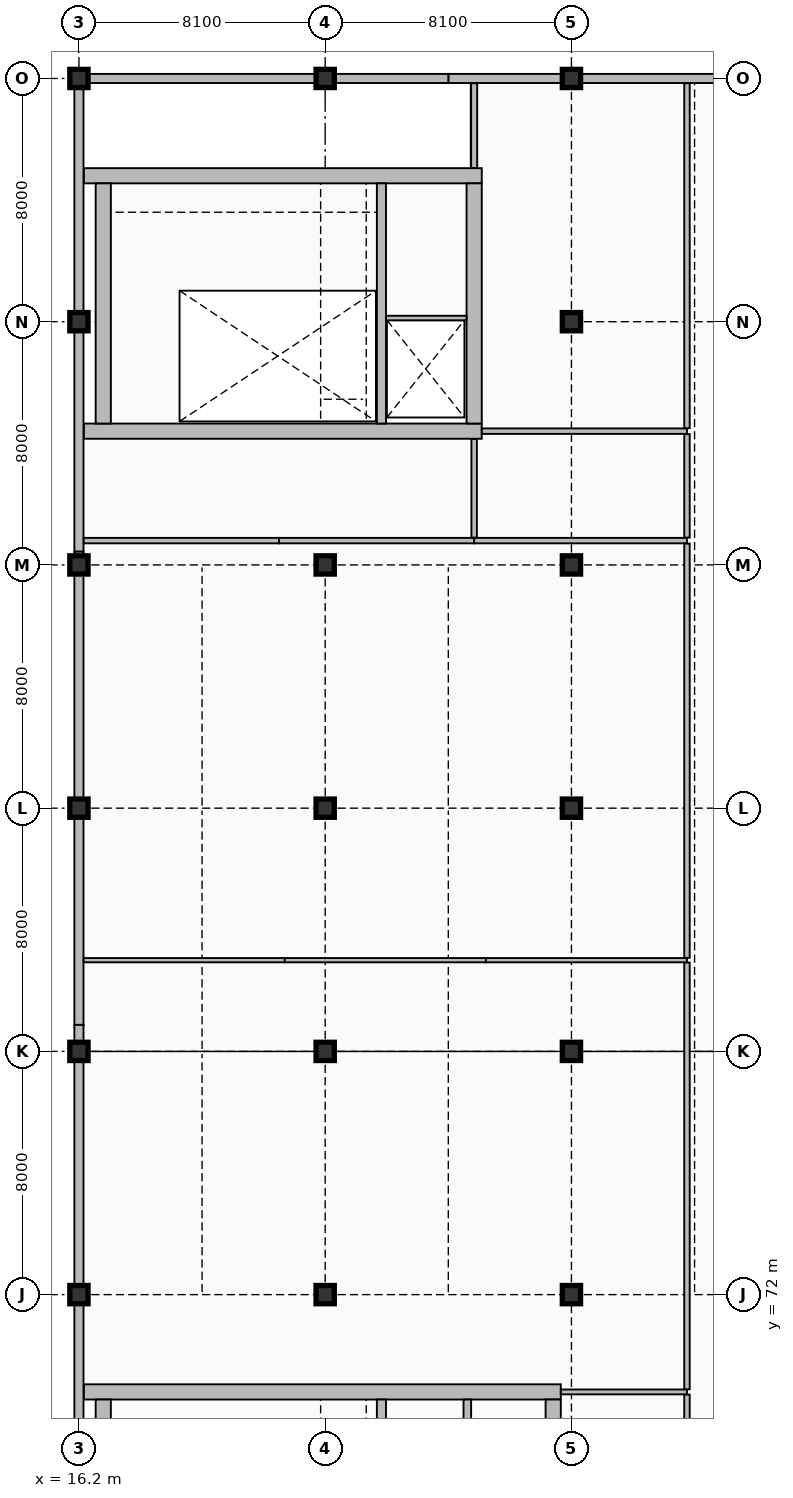
"""IFC4 building model, lengths in metres.
Left out: names, types, materials, properties, quantities, classifications, styles, units other than length and angle.
Written with IfcOpenShell. Run it as: python <this file> out.ifc"""

import sys

from ifc_helpers import new_model, si_unit, direction, frame, frame_2d, origin, origin_2d, place, context, subcontext, project, spatial, rectangle, extrude, element, fill, save


model = new_model("IFC4")
c1 = context("Model", 3, precision=1e-05, world=origin(), true_north=direction((0.0, 1.0)))
c2 = subcontext(c1, "Body", "Model", "MODEL_VIEW")
j1 = project(units=[si_unit("LENGTHUNIT", "METRE"), si_unit("PLANEANGLEUNIT", "RADIAN")], contexts=[c1])
p1 = place(None, origin())
s1 = spatial("IfcSite", under=j1, at=p1, CompositionType="ELEMENT")
p2 = place(p1, origin())
s2 = spatial("IfcBuilding", under=s1, at=p2, CompositionType="ELEMENT")
p3 = place(p2, frame((0.0, 0.0, 19.8)))
s3 = spatial("IfcBuildingStorey", under=s2, at=p3, CompositionType="ELEMENT", Elevation=19.8)
p4 = place(p3, frame((16.36, 68.8, 0.0), z_axis=(0.0, 0.0, 1.0), x_axis=(1.0, 0.0, 0.0)))
e1 = element("IfcWall", 1, at=p4, inside=s3, PredefinedType="SHEAR", context=c2, shape_type="SweptSolid", body=[
    extrude(rectangle(XDim=15.69, YDim=0.5, at=frame_2d((7.845, 0.0))), origin(), (0.0, 0.0, 1.0), 5.1),
])
for number, where, z_axis, x_axis in (
    (2, (17.0, 60.65, 0.0), (0.0, 0.0, 1.0), (0.0, 1.0, 0.0)),
    (3, (31.8, 60.65, 0.0), (0.0, 0.0, 1.0), (0.0, 1.0, 0.0)),
):
    element("IfcWall", number, at=place(p3, frame(where, z_axis=z_axis, x_axis=x_axis)), inside=s3, PredefinedType="SHEAR", context=c2, shape_type="SweptSolid", body=[
        extrude(rectangle(XDim=7.9, YDim=0.5, at=frame_2d((3.95, 0.0))), origin(), (0.0, 0.0, 1.0), 5.1),
    ])
p5 = place(p3, frame((26.15, 60.65, 0.0), z_axis=(0.0, 0.0, 1.0), x_axis=(0.0, 1.0, 0.0)))
e4 = element("IfcWall", 4, at=p5, inside=s3, PredefinedType="SHEAR", context=c2, shape_type="SweptSolid", body=[
    extrude(rectangle(XDim=7.9, YDim=0.3, at=frame_2d((3.95, 0.0))), origin(), (0.0, 0.0, 1.0), 5.1),
])
p6 = place(p3, frame((28.975, 60.65, 0.0), z_axis=(0.0, 0.0, 1.0), x_axis=(0.0, 1.0, 0.0)))
e5 = element("IfcWall", 5, at=p6, inside=s3, PredefinedType="SHEAR", context=c2, shape_type="SweptSolid", body=[
    extrude(rectangle(XDim=7.9, YDim=0.25, at=frame_2d((3.95, 0.0))), origin(), (0.0, 0.0, 1.0), 5.1),
])
p7 = place(p3, frame((16.36, 100.4, 0.0), z_axis=(0.0, 0.0, 1.0), x_axis=(1.0, 0.0, 0.0)))
e6 = element("IfcWall", 6, at=p7, inside=s3, PredefinedType="SHEAR", context=c2, shape_type="SweptSolid", body=[
    extrude(rectangle(XDim=13.09, YDim=0.5, at=frame_2d((6.545, 0.0))), origin(), (0.0, 0.0, 1.0), 5.1),
])
p8 = place(p7, frame((1.39, 0.0, 0.0)))
e7 = element("IfcOpeningElement", 7, at=p8, cuts=e6, PredefinedType="OPENING", context=c2, shape_type="SweptSolid", body=[
    extrude(rectangle(XDim=1.15, YDim=2.25, at=frame_2d((0.575, 1.125))), frame((0.0, 0.26, 0.0), z_axis=(0.0, -1.0, 0.0), x_axis=(1.0, 0.0, 0.0)), (0.0, 0.0, 1.0), 0.52),
])
p9 = place(p7, frame((10.695, 0.0, 0.0)))
e8 = element("IfcOpeningElement", 8, at=p9, cuts=e6, PredefinedType="OPENING", context=c2, shape_type="SweptSolid", body=[
    extrude(rectangle(XDim=1.1, YDim=2.2, at=frame_2d((0.55, 1.1))), frame((0.0, 0.26, 0.0), z_axis=(0.0, -1.0, 0.0), x_axis=(1.0, 0.0, 0.0)), (0.0, 0.0, 1.0), 0.52),
])
p10 = place(p3, frame((16.36, 108.8, 0.0), z_axis=(0.0, 0.0, 1.0), x_axis=(1.0, 0.0, 0.0)))
e9 = element("IfcWall", 9, at=p10, inside=s3, PredefinedType="SHEAR", context=c2, shape_type="SweptSolid", body=[
    extrude(rectangle(XDim=13.09, YDim=0.5, at=frame_2d((6.545, 0.0))), origin(), (0.0, 0.0, 1.0), 5.1),
])
for number, where, z_axis, x_axis in (
    (10, (17.0, 100.65, 0.0), (0.0, 0.0, 1.0), (0.0, 1.0, 0.0)),
    (11, (29.2, 100.65, 0.0), (0.0, 0.0, 1.0), (0.0, 1.0, 0.0)),
):
    element("IfcWall", number, at=place(p3, frame(where, z_axis=z_axis, x_axis=x_axis)), inside=s3, PredefinedType="SHEAR", context=c2, shape_type="SweptSolid", body=[
        extrude(rectangle(XDim=7.9, YDim=0.5, at=frame_2d((3.95, 0.0))), origin(), (0.0, 0.0, 1.0), 5.1),
    ])
p11 = place(p3, frame((26.15, 100.65, 0.0), z_axis=(0.0, 0.0, 1.0), x_axis=(0.0, 1.0, 0.0)))
e12 = element("IfcWall", 12, at=p11, inside=s3, PredefinedType="SHEAR", context=c2, shape_type="SweptSolid", body=[
    extrude(rectangle(XDim=7.9, YDim=0.3, at=frame_2d((3.95, 0.0))), origin(), (0.0, 0.0, 1.0), 5.1),
])
for number, where, z_axis, x_axis in (
    (13, (16.2, 72.0, 0.0), (0.0, 0.0, 1.0), (1.0, 0.0, 0.0)),
    (14, (16.2, 80.0, 0.0), (0.0, 0.0, 1.0), (1.0, 0.0, 0.0)),
    (15, (16.2, 88.0, 0.0), (0.0, 0.0, 1.0), (1.0, 0.0, 0.0)),
    (16, (16.2, 96.0, 0.0), (0.0, 0.0, 1.0), (1.0, 0.0, 0.0)),
    (17, (16.2, 104.0, 0.0), (0.0, 0.0, 1.0), (1.0, 0.0, 0.0)),
    (18, (16.2, 112.0, 0.0), (0.0, 0.0, 1.0), (1.0, 0.0, 0.0)),
    (19, (24.3, 72.0, 0.0), (0.0, 0.0, 1.0), (1.0, 0.0, 0.0)),
    (20, (24.3, 80.0, 0.0), (0.0, 0.0, 1.0), (1.0, 0.0, 0.0)),
    (21, (24.3, 88.0, 0.0), (0.0, 0.0, 1.0), (1.0, 0.0, 0.0)),
    (22, (24.3, 96.0, 0.0), (0.0, 0.0, 1.0), (1.0, 0.0, 0.0)),
    (23, (24.3, 112.0, 0.0), (0.0, 0.0, 1.0), (1.0, 0.0, 0.0)),
    (24, (32.4, 72.0, 0.0), (0.0, 0.0, 1.0), (1.0, 0.0, 0.0)),
    (25, (32.4, 80.0, 0.0), (0.0, 0.0, 1.0), (1.0, 0.0, 0.0)),
    (26, (32.4, 88.0, 0.0), (0.0, 0.0, 1.0), (1.0, 0.0, 0.0)),
    (27, (32.4, 96.0, 0.0), (0.0, 0.0, 1.0), (1.0, 0.0, 0.0)),
    (28, (32.4, 104.0, 0.0), (0.0, 0.0, 1.0), (1.0, 0.0, 0.0)),
    (29, (32.4, 112.0, 0.0), (0.0, 0.0, 1.0), (1.0, 0.0, 0.0)),
):
    element("IfcColumn", number, at=place(p3, frame(where, z_axis=z_axis, x_axis=x_axis)), inside=s3, PredefinedType="COLUMN", context=c2, shape_type="SweptSolid", body=[
        extrude(rectangle(XDim=0.6, YDim=0.6, at=origin_2d()), origin(), (0.0, 0.0, 1.0), 5.1),
    ])
p12 = place(p3, frame((40.5, 112.0, 0.0), z_axis=(0.0, 0.0, 1.0), x_axis=(-1.0, 0.0, 0.0)))
e30 = element("IfcWall", 30, at=p12, inside=s3, PredefinedType="SOLIDWALL", context=c2, shape_type="SweptSolid", body=[
    extrude(rectangle(XDim=12.15, YDim=0.3, at=frame_2d((6.075, 0.0))), origin(), (0.0, 0.0, 1.0), 4.302),
])
p13 = place(p12, frame((5.4, 0.0, 0.85)))
e31 = element("IfcOpeningElement", 31, at=p13, cuts=e30, PredefinedType="OPENING", context=c2, shape_type="SweptSolid", body=[
    extrude(rectangle(XDim=0.9, YDim=2.4, at=frame_2d((0.45, 1.2))), frame((0.0, 0.16, 0.0), z_axis=(0.0, -1.0, 0.0), x_axis=(1.0, 0.0, 0.0)), (0.0, 0.0, 1.0), 0.32),
])
p14 = place(p3, frame((28.35, 112.0, 0.0), z_axis=(0.0, 0.0, 1.0), x_axis=(-1.0, 0.0, 0.0)))
e32 = element("IfcWall", 32, at=p14, inside=s3, PredefinedType="SOLIDWALL", context=c2, shape_type="SweptSolid", body=[
    extrude(rectangle(XDim=12.15, YDim=0.3, at=frame_2d((6.075, 0.0))), origin(), (0.0, 0.0, 1.0), 4.302),
])
p15 = place(p14, frame((5.4, 0.0, 0.95)))
e33 = element("IfcOpeningElement", 33, at=p15, cuts=e32, PredefinedType="OPENING", context=c2, shape_type="SweptSolid", body=[
    extrude(rectangle(XDim=1.2, YDim=1.8, at=frame_2d((0.6, 0.9))), frame((0.0, 0.16, 0.0), z_axis=(0.0, -1.0, 0.0), x_axis=(1.0, 0.0, 0.0)), (0.0, 0.0, 1.0), 0.32),
])
p16 = place(p3, frame((16.2, 112.0, 0.0), z_axis=(0.0, 0.0, 1.0), x_axis=(0.0, -1.0, 0.0)))
e34 = element("IfcWall", 34, at=p16, inside=s3, PredefinedType="SOLIDWALL", context=c2, shape_type="SweptSolid", body=[
    extrude(rectangle(XDim=15.564, YDim=0.3, at=frame_2d((7.782, 0.0))), origin(), (0.0, 0.0, 1.0), 4.352),
])
p17 = place(p3, frame((16.2, 96.436, 0.0), z_axis=(0.0, 0.0, 1.0), x_axis=(0.0, -1.0, 0.0)))
e35 = element("IfcWall", 35, at=p17, inside=s3, PredefinedType="SOLIDWALL", context=c2, shape_type="SweptSolid", body=[
    extrude(rectangle(XDim=15.564, YDim=0.3, at=frame_2d((7.782, 0.0))), origin(), (0.0, 0.0, 1.0), 4.352),
])
p18 = place(p17, frame((4.5, 0.0, 0.95)))
e36 = element("IfcOpeningElement", 36, at=p18, cuts=e35, PredefinedType="OPENING", context=c2, shape_type="SweptSolid", body=[
    extrude(rectangle(XDim=1.35, YDim=1.8, at=frame_2d((0.675, 0.9))), frame((0.0, 0.16, 0.0), z_axis=(0.0, -1.0, 0.0), x_axis=(1.0, 0.0, 0.0)), (0.0, 0.0, 1.0), 0.32),
])
p19 = place(p3, frame((16.2, 80.872, 0.0), z_axis=(0.0, 0.0, 1.0), x_axis=(0.0, -1.0, 0.0)))
e37 = element("IfcWall", 37, at=p19, inside=s3, PredefinedType="SOLIDWALL", context=c2, shape_type="SweptSolid", body=[
    extrude(rectangle(XDim=15.564, YDim=0.3, at=frame_2d((7.782, 0.0))), origin(), (0.0, 0.0, 1.0), 4.352),
])
p20 = place(p19, frame((4.5, 0.0, 0.85)))
e38 = element("IfcOpeningElement", 38, at=p20, cuts=e37, PredefinedType="OPENING", context=c2, shape_type="SweptSolid", body=[
    extrude(rectangle(XDim=1.35, YDim=2.1, at=frame_2d((0.675, 1.05))), frame((0.0, 0.16, 0.0), z_axis=(0.0, -1.0, 0.0), x_axis=(1.0, 0.0, 0.0)), (0.0, 0.0, 1.0), 0.32),
])
p21 = place(p3, frame((26.3, 104.12, 0.0), z_axis=(0.0, 0.0, 1.0), x_axis=(1.0, 0.0, 0.0)))
e39 = element("IfcWall", 39, at=p21, inside=s3, PredefinedType="PARTITIONING", context=c2, shape_type="SweptSolid", body=[
    extrude(rectangle(XDim=2.65, YDim=0.15, at=frame_2d((1.325, 0.0))), origin(), (0.0, 0.0, 1.0), 4.86),
])
for number, where, z_axis, x_axis in (
    (40, (16.358, 83.0, 0.0), (0.0, 0.0, 1.0), (1.0, 0.0, 0.0)),
    (41, (22.972, 83.0, 0.0), (0.0, 0.0, 1.0), (1.0, 0.0, 0.0)),
    (42, (29.586, 83.0, 0.0), (0.0, 0.0, 1.0), (1.0, 0.0, 0.0)),
):
    element("IfcWall", number, at=place(p3, frame(where, z_axis=z_axis, x_axis=x_axis)), inside=s3, PredefinedType="PARTITIONING", context=c2, shape_type="SweptSolid", body=[
        extrude(rectangle(XDim=6.614, YDim=0.14, at=frame_2d((3.307, 0.0))), origin(), (0.0, 0.0, 1.0), 4.86),
    ])
p22 = place(p3, frame((16.358, 96.8, 0.0), z_axis=(0.0, 0.0, 1.0), x_axis=(1.0, 0.0, 0.0)))
e43 = element("IfcWall", 43, at=p22, inside=s3, PredefinedType="PARTITIONING", context=c2, shape_type="SweptSolid", body=[
    extrude(rectangle(XDim=6.421, YDim=0.18, at=frame_2d((3.21, 0.0))), origin(), (0.0, 0.0, 1.0), 4.86),
])
p23 = place(p3, frame((22.779, 96.8, 0.0), z_axis=(0.0, 0.0, 1.0), x_axis=(1.0, 0.0, 0.0)))
e44 = element("IfcWall", 44, at=p23, inside=s3, PredefinedType="PARTITIONING", context=c2, shape_type="SweptSolid", body=[
    extrude(rectangle(XDim=6.421, YDim=0.18, at=frame_2d((3.21, 0.0))), origin(), (0.0, 0.0, 1.0), 4.86),
])
p24 = place(p3, frame((29.2, 96.8, 0.0), z_axis=(0.0, 0.0, 1.0), x_axis=(1.0, 0.0, 0.0)))
e45 = element("IfcWall", 45, at=p24, inside=s3, PredefinedType="PARTITIONING", context=c2, shape_type="SweptSolid", body=[
    extrude(rectangle(XDim=7.0, YDim=0.18, at=frame_2d((3.5, 0.0))), origin(), (0.0, 0.0, 1.0), 4.86),
])
p25 = place(p3, frame((29.45, 100.4, 0.0), z_axis=(0.0, 0.0, 1.0), x_axis=(1.0, 0.0, 0.0)))
e46 = element("IfcWall", 46, at=p25, inside=s3, PredefinedType="PARTITIONING", context=c2, shape_type="SweptSolid", body=[
    extrude(rectangle(XDim=6.75, YDim=0.18, at=frame_2d((3.375, 0.0))), origin(), (0.0, 0.0, 1.0), 4.86),
])
p26 = place(p3, frame((32.05, 68.8, 0.0), z_axis=(0.0, 0.0, 1.0), x_axis=(1.0, 0.0, 0.0)))
e47 = element("IfcWall", 47, at=p26, inside=s3, PredefinedType="PARTITIONING", context=c2, shape_type="SweptSolid", body=[
    extrude(rectangle(XDim=4.15, YDim=0.16, at=frame_2d((2.075, 0.0))), origin(), (0.0, 0.0, 1.0), 4.86),
])
p27 = place(p3, frame((29.2, 96.898, 0.0), z_axis=(0.0, 0.0, 1.0), x_axis=(0.0, 1.0, 0.0)))
e48 = element("IfcWall", 48, at=p27, inside=s3, PredefinedType="PARTITIONING", context=c2, shape_type="SweptSolid", body=[
    extrude(rectangle(XDim=3.244, YDim=0.18, at=frame_2d((1.622, 0.0))), origin(), (0.0, 0.0, 1.0), 4.86),
])
p28 = place(p27, frame((1.022, 0.0, 0.0)))
e49 = element("IfcOpeningElement", 49, at=p28, cuts=e48, PredefinedType="OPENING", context=c2, shape_type="SweptSolid", body=[
    extrude(rectangle(XDim=1.2, YDim=2.2, at=frame_2d((0.6, 1.1))), frame((0.0, 0.1, 0.0), z_axis=(0.0, -1.0, 0.0), x_axis=(1.0, 0.0, 0.0)), (0.0, 0.0, 1.0), 0.2),
])
p29 = place(p3, frame((29.2, 109.058, 0.0), z_axis=(0.0, 0.0, 1.0), x_axis=(0.0, 1.0, 0.0)))
e50 = element("IfcWall", 50, at=p29, inside=s3, PredefinedType="PARTITIONING", context=c2, shape_type="SweptSolid", body=[
    extrude(rectangle(XDim=2.784, YDim=0.2, at=frame_2d((1.392, 0.0))), origin(), (0.0, 0.0, 1.0), 4.86),
])
p30 = place(p3, frame((36.2, 66.088, 0.0), z_axis=(0.0, 0.0, 1.0), x_axis=(0.0, 1.0, 0.0)))
e51 = element("IfcWall", 51, at=p30, inside=s3, PredefinedType="PARTITIONING", context=c2, shape_type="SweptSolid", body=[
    extrude(rectangle(XDim=2.624, YDim=0.18, at=frame_2d((1.312, 0.0))), origin(), (0.0, 0.0, 1.0), 4.86),
])
p31 = place(p30, frame((0.812, 0.0, 0.0)))
e52 = element("IfcOpeningElement", 52, at=p31, cuts=e51, PredefinedType="OPENING", context=c2, shape_type="SweptSolid", body=[
    extrude(rectangle(XDim=1.0, YDim=2.15, at=frame_2d((0.5, 1.075))), frame((0.0, 0.1, 0.0), z_axis=(0.0, -1.0, 0.0), x_axis=(1.0, 0.0, 0.0)), (0.0, 0.0, 1.0), 0.2),
])
p32 = place(p3, frame((36.2, 68.888, 0.0), z_axis=(0.0, 0.0, 1.0), x_axis=(0.0, 1.0, 0.0)))
e53 = element("IfcWall", 53, at=p32, inside=s3, PredefinedType="PARTITIONING", context=c2, shape_type="SweptSolid", body=[
    extrude(rectangle(XDim=14.034, YDim=0.18, at=frame_2d((7.017, 0.0))), origin(), (0.0, 0.0, 1.0), 4.445),
])
p33 = place(p32, frame((6.517, 0.0, 0.0)))
e54 = element("IfcOpeningElement", 54, at=p33, cuts=e53, PredefinedType="OPENING", context=c2, shape_type="SweptSolid", body=[
    extrude(rectangle(XDim=1.0, YDim=2.2, at=frame_2d((0.5, 1.1))), frame((0.0, 0.1, 0.0), z_axis=(0.0, -1.0, 0.0), x_axis=(1.0, 0.0, 0.0)), (0.0, 0.0, 1.0), 0.2),
])
p34 = place(p3, frame((36.2, 83.078, 0.0), z_axis=(0.0, 0.0, 1.0), x_axis=(0.0, 1.0, 0.0)))
e55 = element("IfcWall", 55, at=p34, inside=s3, PredefinedType="PARTITIONING", context=c2, shape_type="SweptSolid", body=[
    extrude(rectangle(XDim=13.624, YDim=0.18, at=frame_2d((6.812, 0.0))), origin(), (0.0, 0.0, 1.0), 4.445),
])
p35 = place(p34, frame((6.312, 0.0, 0.0)))
e56 = element("IfcOpeningElement", 56, at=p35, cuts=e55, PredefinedType="OPENING", context=c2, shape_type="SweptSolid", body=[
    extrude(rectangle(XDim=1.0, YDim=2.2, at=frame_2d((0.5, 1.1))), frame((0.0, 0.1, 0.0), z_axis=(0.0, -1.0, 0.0), x_axis=(1.0, 0.0, 0.0)), (0.0, 0.0, 1.0), 0.2),
])
p36 = place(p3, frame((36.2, 96.898, 0.0), z_axis=(0.0, 0.0, 1.0), x_axis=(0.0, 1.0, 0.0)))
e57 = element("IfcWall", 57, at=p36, inside=s3, PredefinedType="PARTITIONING", context=c2, shape_type="SweptSolid", body=[
    extrude(rectangle(XDim=3.404, YDim=0.18, at=frame_2d((1.702, 0.0))), origin(), (0.0, 0.0, 1.0), 4.445),
])
p37 = place(p36, frame((1.152, 0.0, 0.0)))
e58 = element("IfcOpeningElement", 58, at=p37, cuts=e57, PredefinedType="OPENING", context=c2, shape_type="SweptSolid", body=[
    extrude(rectangle(XDim=1.1, YDim=2.2, at=frame_2d((0.55, 1.1))), frame((0.0, 0.1, 0.0), z_axis=(0.0, -1.0, 0.0), x_axis=(1.0, 0.0, 0.0)), (0.0, 0.0, 1.0), 0.2),
])
p38 = place(p3, frame((36.2, 100.498, 0.0), z_axis=(0.0, 0.0, 1.0), x_axis=(0.0, 1.0, 0.0)))
e59 = element("IfcWall", 59, at=p38, inside=s3, PredefinedType="PARTITIONING", context=c2, shape_type="SweptSolid", body=[
    extrude(rectangle(XDim=11.344, YDim=0.18, at=frame_2d((5.672, 0.0))), origin(), (0.0, 0.0, 1.0), 4.445),
])
p39 = place(p38, frame((5.172, 0.0, 0.0)))
e60 = element("IfcOpeningElement", 60, at=p39, cuts=e59, PredefinedType="OPENING", context=c2, shape_type="SweptSolid", body=[
    extrude(rectangle(XDim=1.0, YDim=2.2, at=frame_2d((0.5, 1.1))), frame((0.0, 0.1, 0.0), z_axis=(0.0, -1.0, 0.0), x_axis=(1.0, 0.0, 0.0)), (0.0, 0.0, 1.0), 0.2),
])
p40 = place(p13, origin())
e61 = element("IfcWindow", 61, at=p40, inside=s3, PartitioningType="DOUBLE_PANEL_HORIZONTAL", PredefinedType="WINDOW", context=c2, shape_type="SweptSolid", body=[
    extrude(rectangle(XDim=0.9, YDim=2.4, at=frame_2d((0.45, 1.2))), frame((0.0, 0.03, 0.0), z_axis=(0.0, -1.0, 0.0), x_axis=(1.0, 0.0, 0.0)), (0.0, 0.0, 1.0), 0.06),
])
fill(e31, e61)
p41 = place(p15, origin())
e62 = element("IfcWindow", 62, at=p41, inside=s3, PartitioningType="SINGLE_PANEL", PredefinedType="WINDOW", context=c2, shape_type="SweptSolid", body=[
    extrude(rectangle(XDim=1.2, YDim=1.8, at=frame_2d((0.6, 0.9))), frame((0.0, 0.03, 0.0), z_axis=(0.0, -1.0, 0.0), x_axis=(1.0, 0.0, 0.0)), (0.0, 0.0, 1.0), 0.06),
])
fill(e33, e62)
p42 = place(p18, origin())
e63 = element("IfcWindow", 63, at=p42, inside=s3, PartitioningType="DOUBLE_PANEL_VERTICAL", PredefinedType="WINDOW", context=c2, shape_type="SweptSolid", body=[
    extrude(rectangle(XDim=1.35, YDim=1.8, at=frame_2d((0.675, 0.9))), frame((0.0, 0.03, 0.0), z_axis=(0.0, -1.0, 0.0), x_axis=(1.0, 0.0, 0.0)), (0.0, 0.0, 1.0), 0.06),
])
fill(e36, e63)
p43 = place(p20, origin())
e64 = element("IfcWindow", 64, at=p43, inside=s3, PartitioningType="DOUBLE_PANEL_VERTICAL", PredefinedType="WINDOW", context=c2, shape_type="SweptSolid", body=[
    extrude(rectangle(XDim=1.35, YDim=2.1, at=frame_2d((0.675, 1.05))), frame((0.0, 0.03, 0.0), z_axis=(0.0, -1.0, 0.0), x_axis=(1.0, 0.0, 0.0)), (0.0, 0.0, 1.0), 0.06),
])
fill(e38, e64)
p44 = place(p8, origin())
e65 = element("IfcDoor", 65, at=p44, inside=s3, OperationType="SINGLE_SWING_RIGHT", PredefinedType="DOOR", context=c2, shape_type="SweptSolid", body=[
    extrude(rectangle(XDim=1.15, YDim=2.25, at=frame_2d((0.575, 1.125))), frame((0.0, 0.025, 0.0), z_axis=(0.0, -1.0, 0.0), x_axis=(1.0, 0.0, 0.0)), (0.0, 0.0, 1.0), 0.05),
])
fill(e7, e65)
p45 = place(p9, frame((1.1, 0.0, 0.0), z_axis=(0.0, 0.0, 1.0), x_axis=(-1.0, 0.0, 0.0)))
e66 = element("IfcDoor", 66, at=p45, inside=s3, OperationType="DOUBLE_DOOR_SLIDING", PredefinedType="DOOR", context=c2, shape_type="SweptSolid", body=[
    extrude(rectangle(XDim=1.1, YDim=2.2, at=frame_2d((0.55, 1.1))), frame((0.0, 0.025, 0.0), z_axis=(0.0, -1.0, 0.0), x_axis=(1.0, 0.0, 0.0)), (0.0, 0.0, 1.0), 0.05),
])
fill(e8, e66)
p46 = place(p28, frame((1.2, 0.0, 0.0), z_axis=(0.0, 0.0, 1.0), x_axis=(-1.0, 0.0, 0.0)))
e67 = element("IfcDoor", 67, at=p46, inside=s3, OperationType="SINGLE_SWING_LEFT", PredefinedType="DOOR", context=c2, shape_type="SweptSolid", body=[
    extrude(rectangle(XDim=1.2, YDim=2.2, at=frame_2d((0.6, 1.1))), frame((0.0, 0.025, 0.0), z_axis=(0.0, -1.0, 0.0), x_axis=(1.0, 0.0, 0.0)), (0.0, 0.0, 1.0), 0.05),
])
fill(e49, e67)
p47 = place(p33, origin())
e68 = element("IfcDoor", 68, at=p47, inside=s3, OperationType="SINGLE_SWING_RIGHT", PredefinedType="DOOR", context=c2, shape_type="SweptSolid", body=[
    extrude(rectangle(XDim=1.0, YDim=2.2, at=frame_2d((0.5, 1.1))), frame((0.0, 0.025, 0.0), z_axis=(0.0, -1.0, 0.0), x_axis=(1.0, 0.0, 0.0)), (0.0, 0.0, 1.0), 0.05),
])
fill(e54, e68)
p48 = place(p35, origin())
e69 = element("IfcDoor", 69, at=p48, inside=s3, OperationType="SINGLE_SWING_LEFT", PredefinedType="DOOR", context=c2, shape_type="SweptSolid", body=[
    extrude(rectangle(XDim=1.0, YDim=2.2, at=frame_2d((0.5, 1.1))), frame((0.0, 0.025, 0.0), z_axis=(0.0, -1.0, 0.0), x_axis=(1.0, 0.0, 0.0)), (0.0, 0.0, 1.0), 0.05),
])
fill(e56, e69)
p49 = place(p37, origin())
e70 = element("IfcDoor", 70, at=p49, inside=s3, OperationType="SINGLE_SWING_RIGHT", PredefinedType="DOOR", context=c2, shape_type="SweptSolid", body=[
    extrude(rectangle(XDim=1.1, YDim=2.2, at=frame_2d((0.55, 1.1))), frame((0.0, 0.025, 0.0), z_axis=(0.0, -1.0, 0.0), x_axis=(1.0, 0.0, 0.0)), (0.0, 0.0, 1.0), 0.05),
])
fill(e58, e70)
p50 = place(p39, origin())
e71 = element("IfcDoor", 71, at=p50, inside=s3, OperationType="SINGLE_SWING_LEFT", PredefinedType="DOOR", context=c2, shape_type="SweptSolid", body=[
    extrude(rectangle(XDim=1.0, YDim=2.2, at=frame_2d((0.5, 1.1))), frame((0.0, 0.025, 0.0), z_axis=(0.0, -1.0, 0.0), x_axis=(1.0, 0.0, 0.0)), (0.0, 0.0, 1.0), 0.05),
])
fill(e60, e71)
save(model, sys.argv[1])
